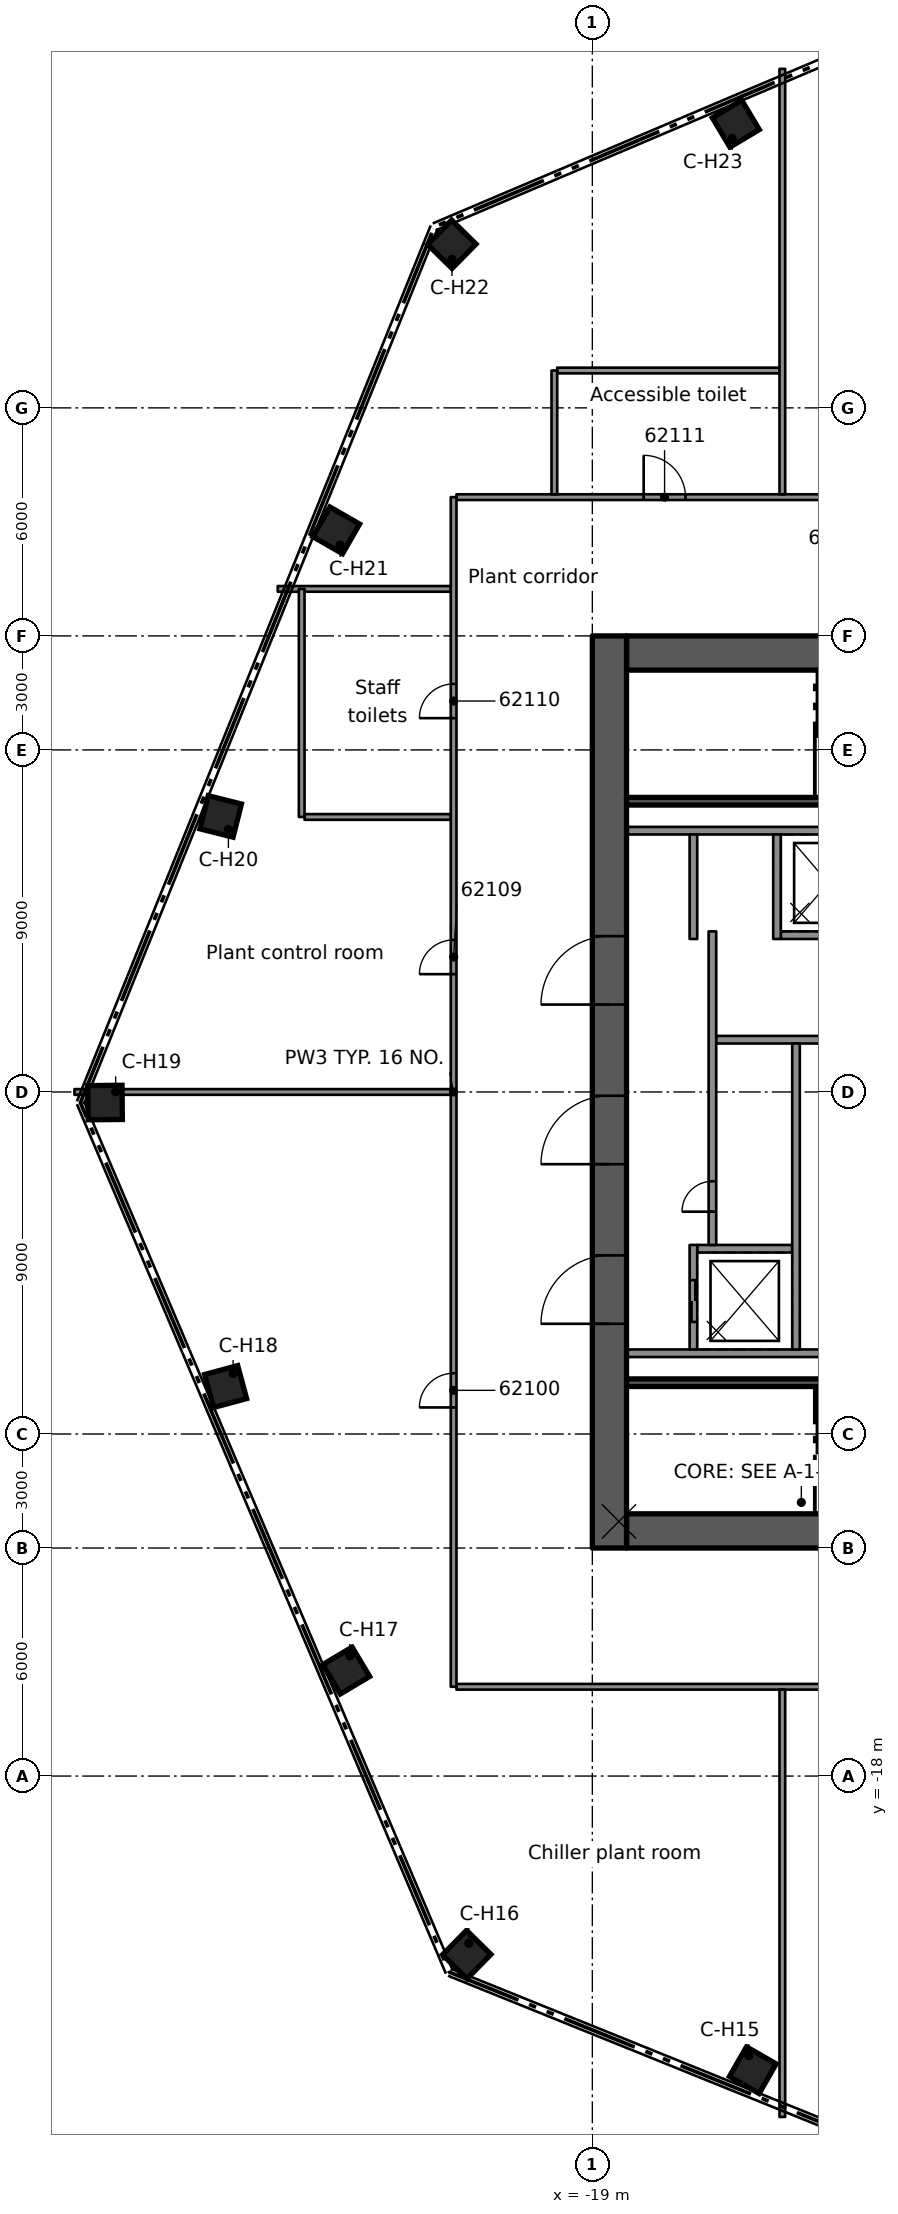
"""IFC4 building model, lengths in metres.
Left out: names, types, materials, properties, quantities, classifications, styles, units other than length and angle.
Written with IfcOpenShell. Run it as: python <this file> out.ifc"""

import sys

from ifc_helpers import new_model, si_unit, direction, frame, frame_2d, origin, origin_2d, place, context, subcontext, project, spatial, rectangle, extrude, element, fill, save


model = new_model("IFC4")
c1 = context("Model", 3, precision=1e-05, world=origin(), true_north=direction((0.0, 1.0)))
c2 = subcontext(c1, "Body", "Model", "MODEL_VIEW")
j1 = project(units=[si_unit("LENGTHUNIT", "METRE"), si_unit("PLANEANGLEUNIT", "RADIAN")], contexts=[c1])
p1 = place(None, origin())
s1 = spatial("IfcSite", under=j1, at=p1, CompositionType="ELEMENT")
p2 = place(p1, origin())
s2 = spatial("IfcBuilding", under=s1, at=p2, CompositionType="ELEMENT")
p3 = place(p2, frame((0.0, 0.0, 299.9)))
s3 = spatial("IfcBuildingStorey", under=s2, at=p3, CompositionType="ELEMENT", Elevation=299.9)
p4 = place(p3, frame((-18.1, 11.55, 0.0), z_axis=(0.0, 0.0, 1.0), x_axis=(1.0, 0.0, 0.0)))
e1 = element("IfcWall", 1, at=p4, inside=s3, PredefinedType="SHEAR", context=c2, shape_type="SweptSolid", body=[
    extrude(rectangle(XDim=9.2, YDim=0.9, at=frame_2d((4.6, 0.0))), origin(), (0.0, 0.0, 1.0), 4.4),
])
p5 = place(p4, frame((5.1, 0.0, 0.0)))
e2 = element("IfcOpeningElement", 2, at=p5, cuts=e1, PredefinedType="OPENING", context=c2, shape_type="SweptSolid", body=[
    extrude(rectangle(XDim=1.1, YDim=2.1, at=frame_2d((0.55, 1.05))), frame((0.0, 0.46, 0.0), z_axis=(0.0, -1.0, 0.0), x_axis=(1.0, 0.0, 0.0)), (0.0, 0.0, 1.0), 0.92),
])
p6 = place(p3, frame((-18.1, -11.55, 0.0), z_axis=(0.0, 0.0, 1.0), x_axis=(1.0, 0.0, 0.0)))
e3 = element("IfcWall", 3, at=p6, inside=s3, PredefinedType="SHEAR", context=c2, shape_type="SweptSolid", body=[
    extrude(rectangle(XDim=9.2, YDim=0.9, at=frame_2d((4.6, 0.0))), origin(), (0.0, 0.0, 1.0), 4.4),
])
p7 = place(p6, frame((5.1, 0.0, 0.0)))
e4 = element("IfcOpeningElement", 4, at=p7, cuts=e3, PredefinedType="OPENING", context=c2, shape_type="SweptSolid", body=[
    extrude(rectangle(XDim=1.1, YDim=2.1, at=frame_2d((0.55, 1.05))), frame((0.0, 0.46, 0.0), z_axis=(0.0, -1.0, 0.0), x_axis=(1.0, 0.0, 0.0)), (0.0, 0.0, 1.0), 0.92),
])
p8 = place(p6, frame((7.53, 0.0, 0.0)))
e5 = element("IfcOpeningElement", 5, at=p8, cuts=e3, PredefinedType="OPENING", context=c2, shape_type="SweptSolid", body=[
    extrude(rectangle(XDim=0.9, YDim=2.1, at=frame_2d((0.45, 1.05))), frame((0.0, 0.46, 0.0), z_axis=(0.0, -1.0, 0.0), x_axis=(1.0, 0.0, 0.0)), (0.0, 0.0, 1.0), 0.92),
])
p9 = place(p3, frame((-18.55, -12.0, 0.0), z_axis=(0.0, 0.0, 1.0), x_axis=(0.0, 1.0, 0.0)))
e6 = element("IfcWall", 6, at=p9, inside=s3, PredefinedType="SHEAR", context=c2, shape_type="SweptSolid", body=[
    extrude(rectangle(XDim=24.0, YDim=0.9, at=frame_2d((12.0, 0.0))), origin(), (0.0, 0.0, 1.0), 4.4),
])
p10 = place(p9, frame((5.9, 0.0, 0.0)))
e7 = element("IfcOpeningElement", 7, at=p10, cuts=e6, PredefinedType="OPENING", context=c2, shape_type="SweptSolid", body=[
    extrude(rectangle(XDim=1.8, YDim=2.1, at=frame_2d((0.9, 1.05))), frame((0.0, 0.46, 0.0), z_axis=(0.0, -1.0, 0.0), x_axis=(1.0, 0.0, 0.0)), (0.0, 0.0, 1.0), 0.92),
])
p11 = place(p9, frame((10.1, 0.0, 0.0)))
e8 = element("IfcOpeningElement", 8, at=p11, cuts=e6, PredefinedType="OPENING", context=c2, shape_type="SweptSolid", body=[
    extrude(rectangle(XDim=1.8, YDim=2.1, at=frame_2d((0.9, 1.05))), frame((0.0, 0.46, 0.0), z_axis=(0.0, -1.0, 0.0), x_axis=(1.0, 0.0, 0.0)), (0.0, 0.0, 1.0), 0.92),
])
p12 = place(p9, frame((14.3, 0.0, 0.0)))
e9 = element("IfcOpeningElement", 9, at=p12, cuts=e6, PredefinedType="OPENING", context=c2, shape_type="SweptSolid", body=[
    extrude(rectangle(XDim=1.8, YDim=2.1, at=frame_2d((0.9, 1.05))), frame((0.0, 0.46, 0.0), z_axis=(0.0, -1.0, 0.0), x_axis=(1.0, 0.0, 0.0)), (0.0, 0.0, 1.0), 0.92),
])
for number, where, z_axis, x_axis in (
    (10, (-14.777, -25.739, 0.0), (0.0, 0.0, 1.0), (-0.498, -0.867, 0.0)),
    (11, (-22.305, -22.697, 0.0), (0.0, 0.0, 1.0), (-0.701, -0.713, 0.0)),
    (12, (-25.477, -15.224, 0.0), (0.0, 0.0, 1.0), (-0.858, -0.513, 0.0)),
    (13, (-28.649, -7.751, 0.0), (0.0, 0.0, 1.0), (-0.965, -0.261, 0.0)),
    (14, (-31.821, -0.278, 0.0), (0.0, 0.0, 1.0), (-1.0, -0.009, 0.0)),
    (15, (-28.78, 7.25, 0.0), (0.0, 0.0, 1.0), (-0.97, 0.244, 0.0)),
    (16, (-25.739, 14.777, 0.0), (0.0, 0.0, 1.0), (-0.867, 0.498, 0.0)),
    (17, (-22.697, 22.305, 0.0), (0.0, 0.0, 1.0), (-0.713, 0.701, 0.0)),
    (18, (-15.224, 25.477, 0.0), (0.0, 0.0, 1.0), (-0.513, 0.858, 0.0)),
):
    element("IfcColumn", number, at=place(p3, frame(where, z_axis=z_axis, x_axis=x_axis)), inside=s3, PredefinedType="COLUMN", context=c2, shape_type="SweptSolid", body=[
        extrude(rectangle(XDim=0.9, YDim=0.9, at=origin_2d()), origin(), (0.0, 0.0, 1.0), 4.4),
    ])
for number, where, z_axis, x_axis in (
    (19, (-11.54, 6.875, 0.0), (0.0, 0.0, 1.0), (-1.0, 0.0, 0.0)),
    (20, (-11.54, -6.875, 0.0), (0.0, 0.0, 1.0), (-1.0, 0.0, 0.0)),
):
    element("IfcWall", number, at=place(p3, frame(where, z_axis=z_axis, x_axis=x_axis)), inside=s3, PredefinedType="SOLIDWALL", context=c2, shape_type="SweptSolid", body=[
        extrude(rectangle(XDim=6.56, YDim=0.2, at=frame_2d((3.28, 0.0))), origin(), (0.0, 0.0, 1.0), 3.98),
    ])
p13 = place(p3, frame((-13.74, -4.125, 0.0), z_axis=(0.0, 0.0, 1.0), x_axis=(-1.0, 0.0, 0.0)))
e21 = element("IfcWall", 21, at=p13, inside=s3, PredefinedType="SOLIDWALL", context=c2, shape_type="SweptSolid", body=[
    extrude(rectangle(XDim=2.5, YDim=0.2, at=frame_2d((1.25, 0.0))), origin(), (0.0, 0.0, 1.0), 3.98),
])
p14 = place(p3, frame((-11.54, 1.375, 0.0), z_axis=(0.0, 0.0, 1.0), x_axis=(-1.0, 0.0, 0.0)))
e22 = element("IfcWall", 22, at=p14, inside=s3, PredefinedType="SOLIDWALL", context=c2, shape_type="SweptSolid", body=[
    extrude(rectangle(XDim=4.2, YDim=0.2, at=frame_2d((2.1, 0.0))), origin(), (0.0, 0.0, 1.0), 3.98),
])
p15 = place(p3, frame((-11.54, 4.125, 0.0), z_axis=(0.0, 0.0, 1.0), x_axis=(-1.0, 0.0, 0.0)))
e23 = element("IfcWall", 23, at=p15, inside=s3, PredefinedType="SOLIDWALL", context=c2, shape_type="SweptSolid", body=[
    extrude(rectangle(XDim=2.5, YDim=0.2, at=frame_2d((1.25, 0.0))), origin(), (0.0, 0.0, 1.0), 3.98),
])
p16 = place(p3, frame((-13.64, -6.775, 0.0), z_axis=(0.0, 0.0, 1.0), x_axis=(0.0, 1.0, 0.0)))
e24 = element("IfcWall", 24, at=p16, inside=s3, PredefinedType="SOLIDWALL", context=c2, shape_type="SweptSolid", body=[
    extrude(rectangle(XDim=8.05, YDim=0.2, at=frame_2d((4.025, 0.0))), origin(), (0.0, 0.0, 1.0), 3.98),
])
p17 = place(p3, frame((-14.14, 4.025, 0.0), z_axis=(0.0, 0.0, 1.0), x_axis=(0.0, 1.0, 0.0)))
e25 = element("IfcWall", 25, at=p17, inside=s3, PredefinedType="SOLIDWALL", context=c2, shape_type="SweptSolid", body=[
    extrude(rectangle(XDim=2.75, YDim=0.2, at=frame_2d((1.375, 0.0))), origin(), (0.0, 0.0, 1.0), 3.98),
])
p18 = place(p3, frame((-16.34, -6.775, 0.0), z_axis=(0.0, 0.0, 1.0), x_axis=(0.0, 1.0, 0.0)))
e26 = element("IfcWall", 26, at=p18, inside=s3, PredefinedType="SOLIDWALL", context=c2, shape_type="SweptSolid", body=[
    extrude(rectangle(XDim=2.75, YDim=0.2, at=frame_2d((1.375, 0.0))), origin(), (0.0, 0.0, 1.0), 3.98),
])
p19 = place(p18, frame((0.725, 0.0, 0.0)))
e27 = element("IfcOpeningElement", 27, at=p19, cuts=e26, PredefinedType="OPENING", context=c2, shape_type="SweptSolid", body=[
    extrude(rectangle(XDim=1.1, YDim=2.1, at=frame_2d((0.55, 1.05))), frame((0.0, 0.11, 0.0), z_axis=(0.0, -1.0, 0.0), x_axis=(1.0, 0.0, 0.0)), (0.0, 0.0, 1.0), 0.22),
])
p20 = place(p3, frame((-15.84, -4.025, 0.0), z_axis=(0.0, 0.0, 1.0), x_axis=(0.0, 1.0, 0.0)))
e28 = element("IfcWall", 28, at=p20, inside=s3, PredefinedType="SOLIDWALL", context=c2, shape_type="SweptSolid", body=[
    extrude(rectangle(XDim=8.25, YDim=0.2, at=frame_2d((4.125, 0.0))), origin(), (0.0, 0.0, 1.0), 3.98),
])
p21 = place(p20, frame((0.875, 0.0, 0.0)))
e29 = element("IfcOpeningElement", 29, at=p21, cuts=e28, PredefinedType="OPENING", context=c2, shape_type="SweptSolid", body=[
    extrude(rectangle(XDim=0.8, YDim=2.1, at=frame_2d((0.4, 1.05))), frame((0.0, 0.11, 0.0), z_axis=(0.0, -1.0, 0.0), x_axis=(1.0, 0.0, 0.0)), (0.0, 0.0, 1.0), 0.22),
])
p22 = place(p3, frame((-16.34, 4.025, 0.0), z_axis=(0.0, 0.0, 1.0), x_axis=(0.0, 1.0, 0.0)))
e30 = element("IfcWall", 30, at=p22, inside=s3, PredefinedType="SOLIDWALL", context=c2, shape_type="SweptSolid", body=[
    extrude(rectangle(XDim=2.75, YDim=0.2, at=frame_2d((1.375, 0.0))), origin(), (0.0, 0.0, 1.0), 3.98),
])
for number, where, z_axis, x_axis in (
    (31, (-11.54, 7.65, 0.0), (0.0, 0.0, 1.0), (-1.0, 0.0, 0.0)),
    (32, (-11.54, -7.65, 0.0), (0.0, 0.0, 1.0), (-1.0, 0.0, 0.0)),
):
    element("IfcWall", number, at=place(p3, frame(where, z_axis=z_axis, x_axis=x_axis)), inside=s3, PredefinedType="SOLIDWALL", context=c2, shape_type="SweptSolid", body=[
        extrude(rectangle(XDim=6.56, YDim=0.2, at=frame_2d((3.28, 0.0))), origin(), (0.0, 0.0, 1.0), 3.98),
    ])
p23 = place(p3, frame((-22.575, -15.651, 0.0), z_axis=(0.0, 0.0, 1.0), x_axis=(1.0, 0.0, 0.0)))
e33 = element("IfcWall", 33, at=p23, inside=s3, PredefinedType="PARTITIONING", context=c2, shape_type="SweptSolid", body=[
    extrude(rectangle(XDim=10.234, YDim=0.15, at=frame_2d((5.117, 0.0))), origin(), (0.0, 0.0, 1.0), 3.98),
])
p24 = place(p3, frame((-32.627, 0.0, 0.0), z_axis=(0.0, 0.0, 1.0), x_axis=(1.0, 0.0, 0.0)))
e34 = element("IfcWall", 34, at=p24, inside=s3, PredefinedType="PARTITIONING", context=c2, shape_type="SweptSolid", body=[
    extrude(rectangle(XDim=9.902, YDim=0.15, at=frame_2d((4.951, 0.0))), origin(), (0.0, 0.0, 1.0), 3.98),
])
p25 = place(p3, frame((-26.573, 7.236, 0.0), z_axis=(0.0, 0.0, 1.0), x_axis=(1.0, 0.0, 0.0)))
e35 = element("IfcWall", 35, at=p25, inside=s3, PredefinedType="PARTITIONING", context=c2, shape_type="SweptSolid", body=[
    extrude(rectangle(XDim=3.848, YDim=0.15, at=frame_2d((1.924, 0.0))), origin(), (0.0, 0.0, 1.0), 3.98),
])
p26 = place(p3, frame((-27.278, 13.237, 0.0), z_axis=(0.0, 0.0, 1.0), x_axis=(1.0, 0.0, 0.0)))
e36 = element("IfcWall", 36, at=p26, inside=s3, PredefinedType="PARTITIONING", context=c2, shape_type="SweptSolid", body=[
    extrude(rectangle(XDim=4.553, YDim=0.15, at=frame_2d((2.276, 0.0))), origin(), (0.0, 0.0, 1.0), 3.98),
])
p27 = place(p3, frame((-22.575, 15.651, 0.0), z_axis=(0.0, 0.0, 1.0), x_axis=(1.0, 0.0, 0.0)))
e37 = element("IfcWall", 37, at=p27, inside=s3, PredefinedType="PARTITIONING", context=c2, shape_type="SweptSolid", body=[
    extrude(rectangle(XDim=10.984, YDim=0.15, at=frame_2d((5.492, 0.0))), origin(), (0.0, 0.0, 1.0), 3.98),
])
p28 = place(p27, frame((4.926, 0.0, 0.0)))
e38 = element("IfcOpeningElement", 38, at=p28, cuts=e37, PredefinedType="OPENING", context=c2, shape_type="SweptSolid", body=[
    extrude(rectangle(XDim=1.1, YDim=2.1, at=frame_2d((0.55, 1.05))), frame((0.0, 0.085, 0.0), z_axis=(0.0, -1.0, 0.0), x_axis=(1.0, 0.0, 0.0)), (0.0, 0.0, 1.0), 0.17),
])
p29 = place(p3, frame((-19.924, 18.983, 0.0), z_axis=(0.0, 0.0, 1.0), x_axis=(1.0, 0.0, 0.0)))
e39 = element("IfcWall", 39, at=p29, inside=s3, PredefinedType="PARTITIONING", context=c2, shape_type="SweptSolid", body=[
    extrude(rectangle(XDim=5.849, YDim=0.15, at=frame_2d((2.925, 0.0))), origin(), (0.0, 0.0, 1.0), 3.98),
])
p30 = place(p3, frame((-14.0, -26.97, 0.0), z_axis=(0.0, 0.0, 1.0), x_axis=(0.0, 1.0, 0.0)))
e40 = element("IfcWall", 40, at=p30, inside=s3, PredefinedType="PARTITIONING", context=c2, shape_type="SweptSolid", body=[
    extrude(rectangle(XDim=11.244, YDim=0.15, at=frame_2d((5.622, 0.0))), origin(), (0.0, 0.0, 1.0), 3.98),
])
p31 = place(p3, frame((-14.0, 15.726, 0.0), z_axis=(0.0, 0.0, 1.0), x_axis=(0.0, 1.0, 0.0)))
e41 = element("IfcWall", 41, at=p31, inside=s3, PredefinedType="PARTITIONING", context=c2, shape_type="SweptSolid", body=[
    extrude(rectangle(XDim=11.194, YDim=0.15, at=frame_2d((5.597, 0.0))), origin(), (0.0, 0.0, 1.0), 3.98),
])
p32 = place(p3, frame((-19.999, 15.726, 0.0), z_axis=(0.0, 0.0, 1.0), x_axis=(0.0, 1.0, 0.0)))
e42 = element("IfcWall", 42, at=p32, inside=s3, PredefinedType="PARTITIONING", context=c2, shape_type="SweptSolid", body=[
    extrude(rectangle(XDim=3.257, YDim=0.15, at=frame_2d((1.628, 0.0))), origin(), (0.0, 0.0, 1.0), 3.98),
])
p33 = place(p3, frame((-22.65, -15.651, 0.0), z_axis=(0.0, 0.0, 1.0), x_axis=(0.0, 1.0, 0.0)))
e43 = element("IfcWall", 43, at=p33, inside=s3, PredefinedType="PARTITIONING", context=c2, shape_type="SweptSolid", body=[
    extrude(rectangle(XDim=31.302, YDim=0.15, at=frame_2d((15.651, 0.0))), origin(), (0.0, 0.0, 1.0), 3.98),
])
p34 = place(p33, frame((7.35, 0.0, 0.0)))
e44 = element("IfcOpeningElement", 44, at=p34, cuts=e43, PredefinedType="OPENING", context=c2, shape_type="SweptSolid", body=[
    extrude(rectangle(XDim=0.9, YDim=2.1, at=frame_2d((0.45, 1.05))), frame((0.0, 0.085, 0.0), z_axis=(0.0, -1.0, 0.0), x_axis=(1.0, 0.0, 0.0)), (0.0, 0.0, 1.0), 0.17),
])
p35 = place(p33, frame((18.751, 0.0, 0.0)))
e45 = element("IfcOpeningElement", 45, at=p35, cuts=e43, PredefinedType="OPENING", context=c2, shape_type="SweptSolid", body=[
    extrude(rectangle(XDim=0.9, YDim=2.1, at=frame_2d((0.45, 1.05))), frame((0.0, 0.085, 0.0), z_axis=(0.0, -1.0, 0.0), x_axis=(1.0, 0.0, 0.0)), (0.0, 0.0, 1.0), 0.17),
])
p36 = place(p33, frame((25.488, 0.0, 0.0)))
e46 = element("IfcOpeningElement", 46, at=p36, cuts=e43, PredefinedType="OPENING", context=c2, shape_type="SweptSolid", body=[
    extrude(rectangle(XDim=0.9, YDim=2.1, at=frame_2d((0.45, 1.05))), frame((0.0, 0.085, 0.0), z_axis=(0.0, -1.0, 0.0), x_axis=(1.0, 0.0, 0.0)), (0.0, 0.0, 1.0), 0.17),
])
p37 = place(p3, frame((-26.648, 7.236, 0.0), z_axis=(0.0, 0.0, 1.0), x_axis=(0.0, 1.0, 0.0)))
e47 = element("IfcWall", 47, at=p37, inside=s3, PredefinedType="PARTITIONING", context=c2, shape_type="SweptSolid", body=[
    extrude(rectangle(XDim=6.001, YDim=0.15, at=frame_2d((3.0, 0.0))), origin(), (0.0, 0.0, 1.0), 3.98),
])
p38 = place(p19, origin())
e48 = element("IfcDoor", 48, at=p38, inside=s3, OperationType="DOUBLE_DOOR_SLIDING", PredefinedType="DOOR", context=c2, shape_type="SweptSolid", body=[
    extrude(rectangle(XDim=1.1, YDim=2.1, at=frame_2d((0.55, 1.05))), frame((0.0, 0.025, 0.0), z_axis=(0.0, -1.0, 0.0), x_axis=(1.0, 0.0, 0.0)), (0.0, 0.0, 1.0), 0.05),
])
fill(e27, e48)
p39 = place(p21, origin())
e49 = element("IfcDoor", 49, at=p39, inside=s3, OperationType="SINGLE_SWING_LEFT", PredefinedType="DOOR", context=c2, shape_type="SweptSolid", body=[
    extrude(rectangle(XDim=0.8, YDim=2.1, at=frame_2d((0.4, 1.05))), frame((0.0, 0.025, 0.0), z_axis=(0.0, -1.0, 0.0), x_axis=(1.0, 0.0, 0.0)), (0.0, 0.0, 1.0), 0.05),
])
fill(e29, e49)
p40 = place(p10, origin())
e50 = element("IfcDoor", 50, at=p40, inside=s3, OperationType="SINGLE_SWING_LEFT", PredefinedType="DOOR", context=c2, shape_type="SweptSolid", body=[
    extrude(rectangle(XDim=1.8, YDim=2.1, at=frame_2d((0.9, 1.05))), frame((0.0, 0.025, 0.0), z_axis=(0.0, -1.0, 0.0), x_axis=(1.0, 0.0, 0.0)), (0.0, 0.0, 1.0), 0.05),
])
fill(e7, e50)
p41 = place(p11, origin())
e51 = element("IfcDoor", 51, at=p41, inside=s3, OperationType="SINGLE_SWING_LEFT", PredefinedType="DOOR", context=c2, shape_type="SweptSolid", body=[
    extrude(rectangle(XDim=1.8, YDim=2.1, at=frame_2d((0.9, 1.05))), frame((0.0, 0.025, 0.0), z_axis=(0.0, -1.0, 0.0), x_axis=(1.0, 0.0, 0.0)), (0.0, 0.0, 1.0), 0.05),
])
fill(e8, e51)
p42 = place(p12, origin())
e52 = element("IfcDoor", 52, at=p42, inside=s3, OperationType="SINGLE_SWING_RIGHT", PredefinedType="DOOR", context=c2, shape_type="SweptSolid", body=[
    extrude(rectangle(XDim=1.8, YDim=2.1, at=frame_2d((0.9, 1.05))), frame((0.0, 0.025, 0.0), z_axis=(0.0, -1.0, 0.0), x_axis=(1.0, 0.0, 0.0)), (0.0, 0.0, 1.0), 0.05),
])
fill(e9, e52)
p43 = place(p34, origin())
e53 = element("IfcDoor", 53, at=p43, inside=s3, OperationType="SINGLE_SWING_LEFT", PredefinedType="DOOR", context=c2, shape_type="SweptSolid", body=[
    extrude(rectangle(XDim=0.9, YDim=2.1, at=frame_2d((0.45, 1.05))), frame((0.0, 0.025, 0.0), z_axis=(0.0, -1.0, 0.0), x_axis=(1.0, 0.0, 0.0)), (0.0, 0.0, 1.0), 0.05),
])
fill(e44, e53)
p44 = place(p35, origin())
e54 = element("IfcDoor", 54, at=p44, inside=s3, OperationType="SINGLE_SWING_RIGHT", PredefinedType="DOOR", context=c2, shape_type="SweptSolid", body=[
    extrude(rectangle(XDim=0.9, YDim=2.1, at=frame_2d((0.45, 1.05))), frame((0.0, 0.025, 0.0), z_axis=(0.0, -1.0, 0.0), x_axis=(1.0, 0.0, 0.0)), (0.0, 0.0, 1.0), 0.05),
])
fill(e45, e54)
p45 = place(p36, origin())
e55 = element("IfcDoor", 55, at=p45, inside=s3, OperationType="SINGLE_SWING_RIGHT", PredefinedType="DOOR", context=c2, shape_type="SweptSolid", body=[
    extrude(rectangle(XDim=0.9, YDim=2.1, at=frame_2d((0.45, 1.05))), frame((0.0, 0.025, 0.0), z_axis=(0.0, -1.0, 0.0), x_axis=(1.0, 0.0, 0.0)), (0.0, 0.0, 1.0), 0.05),
])
fill(e46, e55)
p46 = place(p28, origin())
e56 = element("IfcDoor", 56, at=p46, inside=s3, OperationType="SINGLE_SWING_LEFT", PredefinedType="DOOR", context=c2, shape_type="SweptSolid", body=[
    extrude(rectangle(XDim=1.1, YDim=2.1, at=frame_2d((0.55, 1.05))), frame((0.0, 0.025, 0.0), z_axis=(0.0, -1.0, 0.0), x_axis=(1.0, 0.0, 0.0)), (0.0, 0.0, 1.0), 0.05),
])
fill(e38, e56)
save(model, sys.argv[1])
